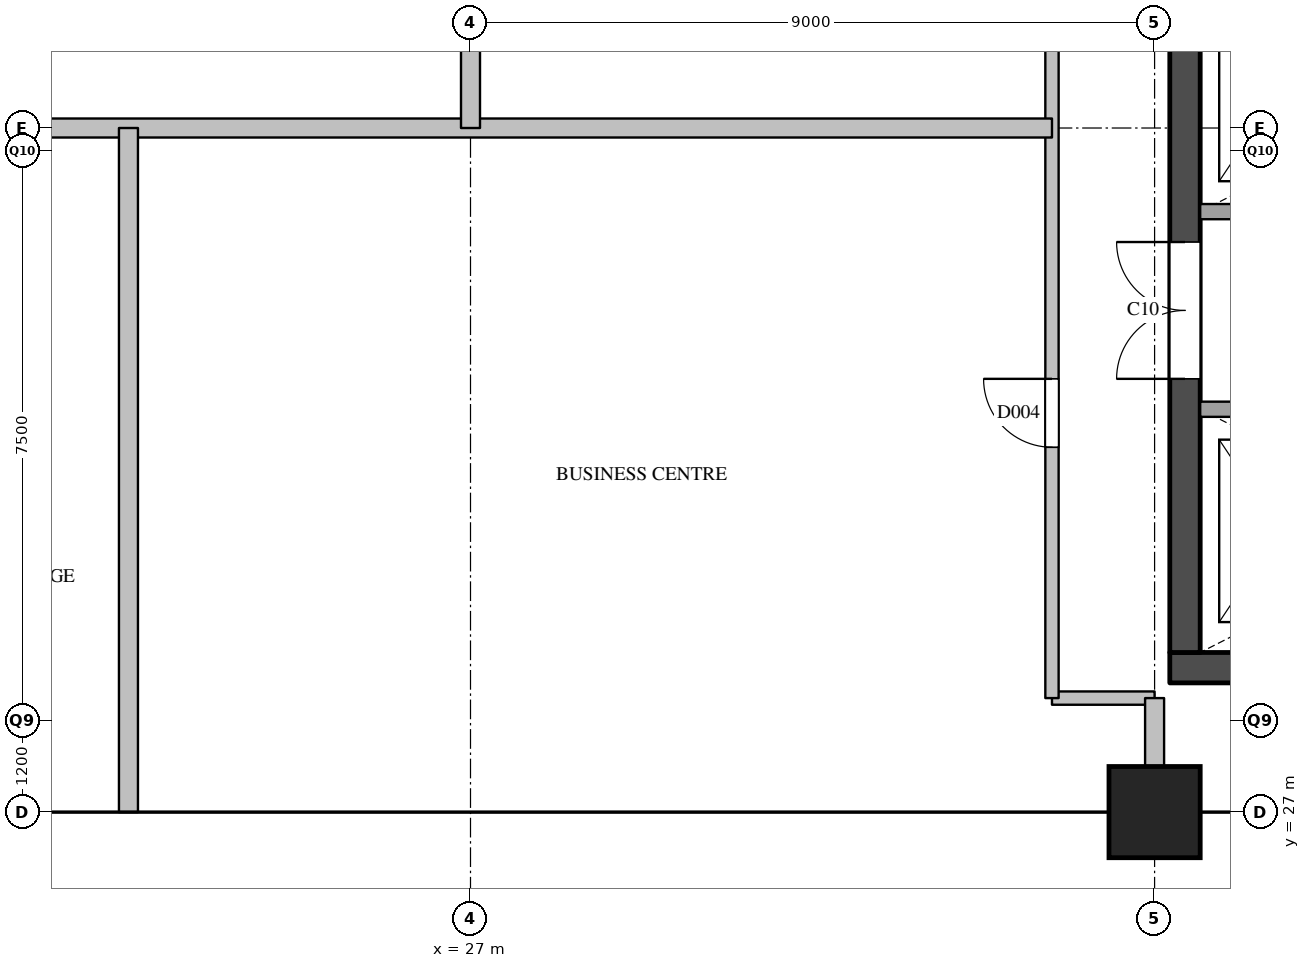
"""IFC4 building model, lengths in metres.
Left out: names, types, materials, properties, quantities, classifications, styles, units other than length and angle.
Written with IfcOpenShell. Run it as: python <this file> out.ifc"""

import sys

from ifc_helpers import new_model, si_unit, direction, frame, frame_2d, origin, origin_2d, place, context, subcontext, project, spatial, rectangle, extrude, element, fill, save


model = new_model("IFC4")
c1 = context("Model", 3, precision=1e-05, world=origin(), true_north=direction((0.0, 1.0)))
c2 = subcontext(c1, "Body", "Model", "MODEL_VIEW")
j1 = project(units=[si_unit("LENGTHUNIT", "METRE"), si_unit("PLANEANGLEUNIT", "RADIAN")], contexts=[c1])
p1 = place(None, origin())
s1 = spatial("IfcSite", under=j1, at=p1, CompositionType="ELEMENT")
p2 = place(p1, origin())
s2 = spatial("IfcBuilding", under=s1, at=p2, CompositionType="ELEMENT")
p3 = place(p2, frame((0.0, 0.0, 230.6)))
s3 = spatial("IfcBuildingStorey", under=s2, at=p3, CompositionType="ELEMENT", Elevation=230.6)
p4 = place(p3, frame((36.0, 27.0, 0.0), z_axis=(0.0, 0.0, 1.0), x_axis=(1.0, 0.0, 0.0)))
e1 = element("IfcColumn", 1, at=p4, inside=s3, PredefinedType="COLUMN", context=c2, shape_type="SweptSolid", body=[
    extrude(rectangle(XDim=1.2, YDim=1.2, at=origin_2d()), origin(), (0.0, 0.0, 1.0), 3.9),
])
p5 = place(p3, frame((36.2, 28.9, 0.0), z_axis=(0.0, 0.0, 1.0), x_axis=(1.0, 0.0, 0.0)))
e2 = element("IfcWall", 2, at=p5, inside=s3, PredefinedType="SHEAR", context=c2, shape_type="SweptSolid", body=[
    extrude(rectangle(XDim=12.0, YDim=0.4, at=frame_2d((6.0, 0.0))), origin(), (0.0, 0.0, 1.0), 3.6),
])
p6 = place(p5, frame((0.85, 0.0, 0.0)))
e3 = element("IfcOpeningElement", 3, at=p6, cuts=e2, PredefinedType="OPENING", context=c2, shape_type="SweptSolid", body=[
    extrude(rectangle(XDim=1.2, YDim=2.1, at=frame_2d((0.6, 1.05))), frame((0.0, 0.21, 0.0), z_axis=(0.0, -1.0, 0.0), x_axis=(1.0, 0.0, 0.0)), (0.0, 0.0, 1.0), 0.42),
])
p7 = place(p5, frame((2.95, 0.0, 0.0)))
e4 = element("IfcOpeningElement", 4, at=p7, cuts=e2, PredefinedType="OPENING", context=c2, shape_type="SweptSolid", body=[
    extrude(rectangle(XDim=1.2, YDim=2.1, at=frame_2d((0.6, 1.05))), frame((0.0, 0.21, 0.0), z_axis=(0.0, -1.0, 0.0), x_axis=(1.0, 0.0, 0.0)), (0.0, 0.0, 1.0), 0.42),
])
p8 = place(p5, frame((5.05, 0.0, 0.0)))
e5 = element("IfcOpeningElement", 5, at=p8, cuts=e2, PredefinedType="OPENING", context=c2, shape_type="SweptSolid", body=[
    extrude(rectangle(XDim=1.2, YDim=2.1, at=frame_2d((0.6, 1.05))), frame((0.0, 0.21, 0.0), z_axis=(0.0, -1.0, 0.0), x_axis=(1.0, 0.0, 0.0)), (0.0, 0.0, 1.0), 0.42),
])
p9 = place(p3, frame((36.4, 29.1, 0.0), z_axis=(0.0, 0.0, 1.0), x_axis=(0.0, 1.0, 0.0)))
e6 = element("IfcWall", 6, at=p9, inside=s3, PredefinedType="SHEAR", context=c2, shape_type="SweptSolid", body=[
    extrude(rectangle(XDim=20.3, YDim=0.4, at=frame_2d((10.15, 0.0))), origin(), (0.0, 0.0, 1.0), 3.6),
])
p10 = place(p9, frame((3.6, 0.0, 0.0)))
e7 = element("IfcOpeningElement", 7, at=p10, cuts=e6, PredefinedType="OPENING", context=c2, shape_type="SweptSolid", body=[
    extrude(rectangle(XDim=1.8, YDim=2.1, at=frame_2d((0.9, 1.05))), frame((0.0, 0.21, 0.0), z_axis=(0.0, -1.0, 0.0), x_axis=(1.0, 0.0, 0.0)), (0.0, 0.0, 1.0), 0.42),
])
p11 = place(p3, frame((36.6, 32.3, 0.0), z_axis=(0.0, 0.0, 1.0), x_axis=(1.0, 0.0, 0.0)))
e8 = element("IfcWall", 8, at=p11, inside=s3, PredefinedType="SOLIDWALL", context=c2, shape_type="SweptSolid", body=[
    extrude(rectangle(XDim=11.2, YDim=0.2, at=frame_2d((5.6, 0.0))), origin(), (0.0, 0.0, 1.0), 3.6),
])
p12 = place(p11, frame((7.225, 0.0, 0.0)))
e9 = element("IfcOpeningElement", 9, at=p12, cuts=e8, PredefinedType="OPENING", context=c2, shape_type="SweptSolid", body=[
    extrude(rectangle(XDim=1.2, YDim=2.1, at=frame_2d((0.6, 1.05))), frame((0.0, 0.11, 0.0), z_axis=(0.0, -1.0, 0.0), x_axis=(1.0, 0.0, 0.0)), (0.0, 0.0, 1.0), 0.22),
])
p13 = place(p11, frame((9.475, 0.0, 0.0)))
e10 = element("IfcOpeningElement", 10, at=p13, cuts=e8, PredefinedType="OPENING", context=c2, shape_type="SweptSolid", body=[
    extrude(rectangle(XDim=1.2, YDim=2.1, at=frame_2d((0.6, 1.05))), frame((0.0, 0.11, 0.0), z_axis=(0.0, -1.0, 0.0), x_axis=(1.0, 0.0, 0.0)), (0.0, 0.0, 1.0), 0.22),
])
p14 = place(p3, frame((36.6, 34.9, 0.0), z_axis=(0.0, 0.0, 1.0), x_axis=(1.0, 0.0, 0.0)))
e11 = element("IfcWall", 11, at=p14, inside=s3, PredefinedType="SOLIDWALL", context=c2, shape_type="SweptSolid", body=[
    extrude(rectangle(XDim=6.3, YDim=0.2, at=frame_2d((3.15, 0.0))), origin(), (0.0, 0.0, 1.0), 3.6),
])
p15 = place(p3, frame((34.65, 28.5, 0.0), z_axis=(0.0, 0.0, 1.0), x_axis=(1.0, 0.0, 0.0)))
e12 = element("IfcWall", 12, at=p15, inside=s3, PredefinedType="PARTITIONING", context=c2, shape_type="SweptSolid", body=[
    extrude(rectangle(XDim=1.35, YDim=0.175, at=frame_2d((0.675, 0.0))), origin(), (0.0, 0.0, 1.0), 3.6),
])
p16 = place(p3, frame((34.65, 28.5, 0.0), z_axis=(0.0, 0.0, 1.0), x_axis=(0.0, 1.0, 0.0)))
e13 = element("IfcWall", 13, at=p16, inside=s3, PredefinedType="PARTITIONING", context=c2, shape_type="SweptSolid", body=[
    extrude(rectangle(XDim=22.85, YDim=0.175, at=frame_2d((11.425, 0.0))), origin(), (0.0, 0.0, 1.0), 3.6),
])
p17 = place(p16, frame((3.3, 0.0, 0.0)))
e14 = element("IfcOpeningElement", 14, at=p17, cuts=e13, PredefinedType="OPENING", context=c2, shape_type="SweptSolid", body=[
    extrude(rectangle(XDim=0.9, YDim=2.1, at=frame_2d((0.45, 1.05))), frame((0.0, 0.097, 0.0), z_axis=(0.0, -1.0, 0.0), x_axis=(1.0, 0.0, 0.0)), (0.0, 0.0, 1.0), 0.195),
])
p18 = place(p16, frame((11.5, 0.0, 0.0)))
e15 = element("IfcOpeningElement", 15, at=p18, cuts=e13, PredefinedType="OPENING", context=c2, shape_type="SweptSolid", body=[
    extrude(rectangle(XDim=1.0, YDim=2.1, at=frame_2d((0.5, 1.05))), frame((0.0, 0.097, 0.0), z_axis=(0.0, -1.0, 0.0), x_axis=(1.0, 0.0, 0.0)), (0.0, 0.0, 1.0), 0.195),
])
p19 = place(p16, frame((19.225, 0.0, 0.0)))
e16 = element("IfcOpeningElement", 16, at=p19, cuts=e13, PredefinedType="OPENING", context=c2, shape_type="SweptSolid", body=[
    extrude(rectangle(XDim=0.9, YDim=2.1, at=frame_2d((0.45, 1.05))), frame((0.0, 0.097, 0.0), z_axis=(0.0, -1.0, 0.0), x_axis=(1.0, 0.0, 0.0)), (0.0, 0.0, 1.0), 0.195),
])
p20 = place(p3, frame((19.35, 36.0, 0.0), z_axis=(0.0, 0.0, 1.0), x_axis=(1.0, 0.0, 0.0)))
e17 = element("IfcWall", 17, at=p20, inside=s3, PredefinedType="PARTITIONING", context=c2, shape_type="SweptSolid", body=[
    extrude(rectangle(XDim=15.3, YDim=0.25, at=frame_2d((7.65, 0.0))), origin(), (0.0, 0.0, 1.0), 3.6),
])
p21 = place(p3, frame((22.5, 27.0, 0.0), z_axis=(0.0, 0.0, 1.0), x_axis=(0.0, 1.0, 0.0)))
e18 = element("IfcWall", 18, at=p21, inside=s3, PredefinedType="PARTITIONING", context=c2, shape_type="SweptSolid", body=[
    extrude(rectangle(XDim=9.0, YDim=0.25, at=frame_2d((4.5, 0.0))), origin(), (0.0, 0.0, 1.0), 3.6),
])
p22 = place(p3, frame((27.0, 36.0, 0.0), z_axis=(0.0, 0.0, 1.0), x_axis=(0.0, 1.0, 0.0)))
e19 = element("IfcWall", 19, at=p22, inside=s3, PredefinedType="PARTITIONING", context=c2, shape_type="SweptSolid", body=[
    extrude(rectangle(XDim=18.0, YDim=0.25, at=frame_2d((9.0, 0.0))), origin(), (0.0, 0.0, 1.0), 3.6),
])
p23 = place(p3, frame((36.0, 27.0, 0.0), z_axis=(0.0, 0.0, 1.0), x_axis=(0.0, 1.0, 0.0)))
e20 = element("IfcWall", 20, at=p23, inside=s3, PredefinedType="PARTITIONING", context=c2, shape_type="SweptSolid", body=[
    extrude(rectangle(XDim=1.5, YDim=0.25, at=frame_2d((0.75, 0.0))), origin(), (0.0, 0.0, 1.0), 3.6),
])
p24 = place(p10, origin())
e21 = element("IfcDoor", 21, at=p24, inside=s3, OperationType="DOUBLE_DOOR_SINGLE_SWING", PredefinedType="DOOR", context=c2, shape_type="SweptSolid", body=[
    extrude(rectangle(XDim=1.8, YDim=2.1, at=frame_2d((0.9, 1.05))), frame((0.0, 0.025, 0.0), z_axis=(0.0, -1.0, 0.0), x_axis=(1.0, 0.0, 0.0)), (0.0, 0.0, 1.0), 0.05),
])
fill(e7, e21)
p25 = place(p17, origin())
e22 = element("IfcDoor", 22, at=p25, inside=s3, OperationType="SINGLE_SWING_RIGHT", PredefinedType="DOOR", context=c2, shape_type="SweptSolid", body=[
    extrude(rectangle(XDim=0.9, YDim=2.1, at=frame_2d((0.45, 1.05))), frame((0.0, 0.025, 0.0), z_axis=(0.0, -1.0, 0.0), x_axis=(1.0, 0.0, 0.0)), (0.0, 0.0, 1.0), 0.05),
])
fill(e14, e22)
save(model, sys.argv[1])
